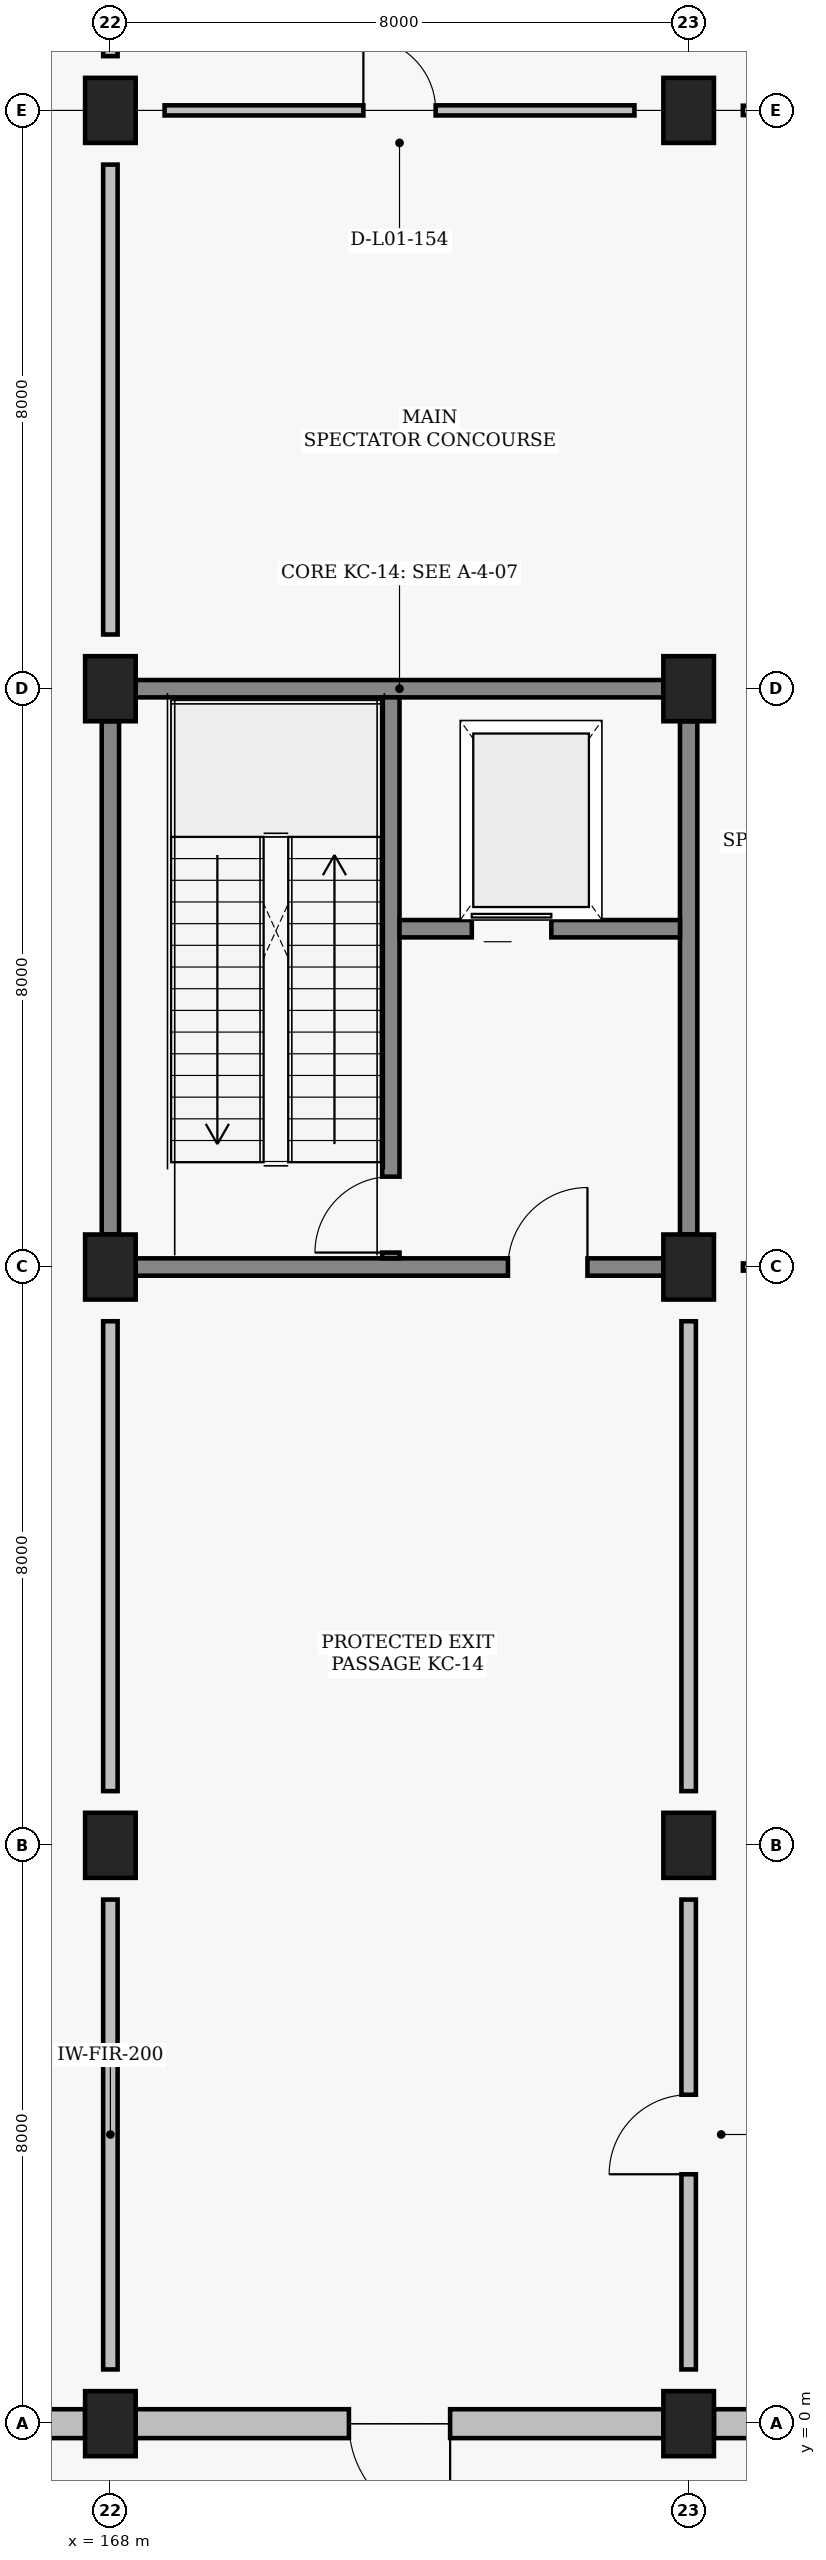
"""IFC4 building model, lengths in metres.
Left out: names, types, materials, properties, quantities, classifications, styles, units other than length and angle.
Written with IfcOpenShell. Run it as: python <this file> out.ifc"""

import sys

from ifc_helpers import new_model, si_unit, direction, frame, frame_2d, origin, origin_2d, place, context, subcontext, project, spatial, rectangle, extrude, element, fill, save


model = new_model("IFC4")
c1 = context("Model", 3, precision=1e-05, world=origin(), true_north=direction((0.0, 1.0)))
c2 = subcontext(c1, "Body", "Model", "MODEL_VIEW")
j1 = project(units=[si_unit("LENGTHUNIT", "METRE"), si_unit("PLANEANGLEUNIT", "RADIAN")], contexts=[c1])
p1 = place(None, origin())
s1 = spatial("IfcSite", under=j1, at=p1, CompositionType="ELEMENT")
p2 = place(p1, origin())
s2 = spatial("IfcBuilding", under=s1, at=p2, CompositionType="ELEMENT")
p3 = place(p2, origin())
s3 = spatial("IfcBuildingStorey", under=s2, at=p3, CompositionType="ELEMENT", Elevation=0.0)
for number, where, z_axis, x_axis in (
    (1, (168.0, 0.0, 0.0), (0.0, 0.0, 1.0), (1.0, 0.0, 0.0)),
    (2, (168.0, 8.0, 0.0), (0.0, 0.0, 1.0), (1.0, 0.0, 0.0)),
    (3, (168.0, 16.0, 0.0), (0.0, 0.0, 1.0), (1.0, 0.0, 0.0)),
    (4, (168.0, 24.0, 0.0), (0.0, 0.0, 1.0), (1.0, 0.0, 0.0)),
    (5, (168.0, 32.0, 0.0), (0.0, 0.0, 1.0), (1.0, 0.0, 0.0)),
    (6, (176.0, 0.0, 0.0), (0.0, 0.0, 1.0), (1.0, 0.0, 0.0)),
    (7, (176.0, 8.0, 0.0), (0.0, 0.0, 1.0), (1.0, 0.0, 0.0)),
    (8, (176.0, 16.0, 0.0), (0.0, 0.0, 1.0), (1.0, 0.0, 0.0)),
    (9, (176.0, 24.0, 0.0), (0.0, 0.0, 1.0), (1.0, 0.0, 0.0)),
    (10, (176.0, 32.0, 0.0), (0.0, 0.0, 1.0), (1.0, 0.0, 0.0)),
):
    element("IfcColumn", number, at=place(p3, frame(where, z_axis=z_axis, x_axis=x_axis)), inside=s3, PredefinedType="COLUMN", context=c2, shape_type="SweptSolid", body=[
        extrude(rectangle(XDim=0.7, YDim=0.9, at=origin_2d()), origin(), (0.0, 0.0, 1.0), 4.8),
    ])
p4 = place(p3, frame((167.65, 0.0, 0.0), z_axis=(0.0, 0.0, 1.0), x_axis=(-1.0, 0.0, 0.0)))
e11 = element("IfcWall", 11, at=p4, inside=s3, PredefinedType="SOLIDWALL", context=c2, shape_type="SweptSolid", body=[
    extrude(rectangle(XDim=7.3, YDim=0.4, at=frame_2d((3.65, 0.0))), origin(), (0.0, 0.0, 1.0), 3.81),
])
p5 = place(p4, frame((2.95, 0.0, 0.0)))
e12 = element("IfcOpeningElement", 12, at=p5, cuts=e11, PredefinedType="OPENING", context=c2, shape_type="SweptSolid", body=[
    extrude(rectangle(XDim=1.4, YDim=2.2, at=frame_2d((0.7, 1.1))), frame((0.0, 0.21, 0.0), z_axis=(0.0, -1.0, 0.0), x_axis=(1.0, 0.0, 0.0)), (0.0, 0.0, 1.0), 0.42),
])
p6 = place(p3, frame((175.65, 0.0, 0.0), z_axis=(0.0, 0.0, 1.0), x_axis=(-1.0, 0.0, 0.0)))
e13 = element("IfcWall", 13, at=p6, inside=s3, PredefinedType="SOLIDWALL", context=c2, shape_type="SweptSolid", body=[
    extrude(rectangle(XDim=7.3, YDim=0.4, at=frame_2d((3.65, 0.0))), origin(), (0.0, 0.0, 1.0), 3.81),
])
p7 = place(p6, frame((2.95, 0.0, 0.0)))
e14 = element("IfcOpeningElement", 14, at=p7, cuts=e13, PredefinedType="OPENING", context=c2, shape_type="SweptSolid", body=[
    extrude(rectangle(XDim=1.4, YDim=2.2, at=frame_2d((0.7, 1.1))), frame((0.0, 0.21, 0.0), z_axis=(0.0, -1.0, 0.0), x_axis=(1.0, 0.0, 0.0)), (0.0, 0.0, 1.0), 0.42),
])
p8 = place(p3, frame((176.35, 0.0, 0.0), z_axis=(0.0, 0.0, 1.0), x_axis=(1.0, 0.0, 0.0)))
e15 = element("IfcWall", 15, at=p8, inside=s3, PredefinedType="SOLIDWALL", context=c2, shape_type="SweptSolid", body=[
    extrude(rectangle(XDim=7.3, YDim=0.4, at=frame_2d((3.65, 0.0))), origin(), (0.0, 0.0, 1.0), 3.81),
])
p9 = place(p8, frame((1.95, 0.0, 0.0)))
e16 = element("IfcOpeningElement", 16, at=p9, cuts=e15, PredefinedType="OPENING", context=c2, shape_type="SweptSolid", body=[
    extrude(rectangle(XDim=3.4, YDim=2.75, at=frame_2d((1.7, 1.375))), frame((0.0, 0.21, 0.0), z_axis=(0.0, -1.0, 0.0), x_axis=(1.0, 0.0, 0.0)), (0.0, 0.0, 1.0), 0.42),
])
p10 = place(p3, frame((168.35, 16.0, 0.0), z_axis=(0.0, 0.0, 1.0), x_axis=(1.0, 0.0, 0.0)))
e17 = element("IfcWall", 17, at=p10, inside=s3, PredefinedType="SHEAR", context=c2, shape_type="SweptSolid", body=[
    extrude(rectangle(XDim=7.3, YDim=0.24, at=frame_2d((3.65, 0.0))), origin(), (0.0, 0.0, 1.0), 3.81),
])
p11 = place(p10, frame((5.15, 0.0, 0.0)))
e18 = element("IfcOpeningElement", 18, at=p11, cuts=e17, PredefinedType="OPENING", context=c2, shape_type="SweptSolid", body=[
    extrude(rectangle(XDim=1.1, YDim=2.2, at=frame_2d((0.55, 1.1))), frame((0.0, 0.13, 0.0), z_axis=(0.0, -1.0, 0.0), x_axis=(1.0, 0.0, 0.0)), (0.0, 0.0, 1.0), 0.26),
])
p12 = place(p3, frame((168.35, 24.0, 0.0), z_axis=(0.0, 0.0, 1.0), x_axis=(1.0, 0.0, 0.0)))
e19 = element("IfcWall", 19, at=p12, inside=s3, PredefinedType="SHEAR", context=c2, shape_type="SweptSolid", body=[
    extrude(rectangle(XDim=7.3, YDim=0.24, at=frame_2d((3.65, 0.0))), origin(), (0.0, 0.0, 1.0), 3.66),
])
p13 = place(p3, frame((168.0, 16.45, 0.0), z_axis=(0.0, 0.0, 1.0), x_axis=(0.0, 1.0, 0.0)))
e20 = element("IfcWall", 20, at=p13, inside=s3, PredefinedType="SHEAR", context=c2, shape_type="SweptSolid", body=[
    extrude(rectangle(XDim=7.1, YDim=0.24, at=frame_2d((3.55, 0.0))), origin(), (0.0, 0.0, 1.0), 3.81),
])
p14 = place(p3, frame((176.0, 16.45, 0.0), z_axis=(0.0, 0.0, 1.0), x_axis=(0.0, 1.0, 0.0)))
e21 = element("IfcWall", 21, at=p14, inside=s3, PredefinedType="SHEAR", context=c2, shape_type="SweptSolid", body=[
    extrude(rectangle(XDim=7.1, YDim=0.24, at=frame_2d((3.55, 0.0))), origin(), (0.0, 0.0, 1.0), 3.66),
])
p15 = place(p3, frame((171.88, 16.12, 0.0), z_axis=(0.0, 0.0, 1.0), x_axis=(0.0, 1.0, 0.0)))
e22 = element("IfcWall", 22, at=p15, inside=s3, PredefinedType="SHEAR", context=c2, shape_type="SweptSolid", body=[
    extrude(rectangle(XDim=7.76, YDim=0.24, at=frame_2d((3.88, 0.0))), origin(), (0.0, 0.0, 1.0), 4.01),
])
p16 = place(p15, frame((0.08, 0.0, 0.0)))
e23 = element("IfcOpeningElement", 23, at=p16, cuts=e22, PredefinedType="OPENING", context=c2, shape_type="SweptSolid", body=[
    extrude(rectangle(XDim=1.05, YDim=2.15, at=frame_2d((0.525, 1.075))), frame((0.0, 0.13, 0.0), z_axis=(0.0, -1.0, 0.0), x_axis=(1.0, 0.0, 0.0)), (0.0, 0.0, 1.0), 0.26),
])
p17 = place(p3, frame((172.0, 20.68, 0.0), z_axis=(0.0, 0.0, 1.0), x_axis=(1.0, 0.0, 0.0)))
e24 = element("IfcWall", 24, at=p17, inside=s3, PredefinedType="SHEAR", context=c2, shape_type="SweptSolid", body=[
    extrude(rectangle(XDim=3.88, YDim=0.24, at=frame_2d((1.94, 0.0))), origin(), (0.0, 0.0, 1.0), 3.81),
])
p18 = place(p17, frame((1.0, 0.0, 0.0)))
e25 = element("IfcOpeningElement", 25, at=p18, cuts=e24, PredefinedType="OPENING", context=c2, shape_type="SweptSolid", body=[
    extrude(rectangle(XDim=1.1, YDim=2.15, at=frame_2d((0.55, 1.075))), frame((0.0, 0.13, 0.0), z_axis=(0.0, -1.0, 0.0), x_axis=(1.0, 0.0, 0.0)), (0.0, 0.0, 1.0), 0.26),
])
p19 = place(p3, frame((168.0, 0.75, 0.0), z_axis=(0.0, 0.0, 1.0), x_axis=(0.0, 1.0, 0.0)))
e26 = element("IfcWall", 26, at=p19, inside=s3, PredefinedType="PARTITIONING", context=c2, shape_type="SweptSolid", body=[
    extrude(rectangle(XDim=6.5, YDim=0.2, at=frame_2d((3.25, 0.0))), origin(), (0.0, 0.0, 1.0), 3.81),
])
p20 = place(p3, frame((176.0, 0.75, 0.0), z_axis=(0.0, 0.0, 1.0), x_axis=(0.0, 1.0, 0.0)))
e27 = element("IfcWall", 27, at=p20, inside=s3, PredefinedType="PARTITIONING", context=c2, shape_type="SweptSolid", body=[
    extrude(rectangle(XDim=6.5, YDim=0.2, at=frame_2d((3.25, 0.0))), origin(), (0.0, 0.0, 1.0), 3.81),
])
p21 = place(p20, frame((2.7, 0.0, 0.0)))
e28 = element("IfcOpeningElement", 28, at=p21, cuts=e27, PredefinedType="OPENING", context=c2, shape_type="SweptSolid", body=[
    extrude(rectangle(XDim=1.1, YDim=2.2, at=frame_2d((0.55, 1.1))), frame((0.0, 0.11, 0.0), z_axis=(0.0, -1.0, 0.0), x_axis=(1.0, 0.0, 0.0)), (0.0, 0.0, 1.0), 0.22),
])
for number, where, z_axis, x_axis in (
    (29, (168.0, 8.75, 0.0), (0.0, 0.0, 1.0), (0.0, 1.0, 0.0)),
    (30, (176.0, 8.75, 0.0), (0.0, 0.0, 1.0), (0.0, 1.0, 0.0)),
    (31, (168.0, 24.75, 0.0), (0.0, 0.0, 1.0), (0.0, 1.0, 0.0)),
    (32, (168.0, 32.75, 0.0), (0.0, 0.0, 1.0), (0.0, 1.0, 0.0)),
):
    element("IfcWall", number, at=place(p3, frame(where, z_axis=z_axis, x_axis=x_axis)), inside=s3, PredefinedType="PARTITIONING", context=c2, shape_type="SweptSolid", body=[
        extrude(rectangle(XDim=6.5, YDim=0.2, at=frame_2d((3.25, 0.0))), origin(), (0.0, 0.0, 1.0), 3.81),
    ])
p22 = place(p3, frame((168.75, 32.0, 0.0), z_axis=(0.0, 0.0, 1.0), x_axis=(1.0, 0.0, 0.0)))
e33 = element("IfcWall", 33, at=p22, inside=s3, PredefinedType="MOVABLE", context=c2, shape_type="SweptSolid", body=[
    extrude(rectangle(XDim=6.5, YDim=0.14, at=frame_2d((3.25, 0.0))), origin(), (0.0, 0.0, 1.0), 3.66),
])
p23 = place(p22, frame((2.75, 0.0, 0.0)))
e34 = element("IfcOpeningElement", 34, at=p23, cuts=e33, PredefinedType="OPENING", context=c2, shape_type="SweptSolid", body=[
    extrude(rectangle(XDim=1.0, YDim=2.1, at=frame_2d((0.5, 1.05))), frame((0.0, 0.08, 0.0), z_axis=(0.0, -1.0, 0.0), x_axis=(1.0, 0.0, 0.0)), (0.0, 0.0, 1.0), 0.16),
])
p24 = place(p3, frame((176.75, 16.0, 0.0), z_axis=(0.0, 0.0, 1.0), x_axis=(1.0, 0.0, 0.0)))
e35 = element("IfcWall", 35, at=p24, inside=s3, PredefinedType="PARTITIONING", context=c2, shape_type="SweptSolid", body=[
    extrude(rectangle(XDim=6.5, YDim=0.1, at=frame_2d((3.25, 0.0))), origin(), (0.0, 0.0, 1.0), 3.91),
])
p25 = place(p24, frame((2.775, 0.0, 0.0)))
e36 = element("IfcOpeningElement", 36, at=p25, cuts=e35, PredefinedType="OPENING", context=c2, shape_type="SweptSolid", body=[
    extrude(rectangle(XDim=0.95, YDim=2.1, at=frame_2d((0.475, 1.05))), frame((0.0, 0.06, 0.0), z_axis=(0.0, -1.0, 0.0), x_axis=(1.0, 0.0, 0.0)), (0.0, 0.0, 1.0), 0.12),
])
p26 = place(p3, frame((176.75, 32.0, 0.0), z_axis=(0.0, 0.0, 1.0), x_axis=(1.0, 0.0, 0.0)))
e37 = element("IfcWall", 37, at=p26, inside=s3, PredefinedType="PARTITIONING", context=c2, shape_type="SweptSolid", body=[
    extrude(rectangle(XDim=6.5, YDim=0.13, at=frame_2d((3.25, 0.0))), origin(), (0.0, 0.0, 1.0), 3.91),
])
p27 = place(p26, frame((2.75, 0.0, 0.0)))
e38 = element("IfcOpeningElement", 38, at=p27, cuts=e37, PredefinedType="OPENING", context=c2, shape_type="SweptSolid", body=[
    extrude(rectangle(XDim=1.0, YDim=2.1, at=frame_2d((0.5, 1.05))), frame((0.0, 0.075, 0.0), z_axis=(0.0, -1.0, 0.0), x_axis=(1.0, 0.0, 0.0)), (0.0, 0.0, 1.0), 0.15),
])
p28 = place(p7, origin())
e39 = element("IfcDoor", 39, at=p28, inside=s3, OperationType="SINGLE_SWING_LEFT", PredefinedType="DOOR", context=c2, shape_type="SweptSolid", body=[
    extrude(rectangle(XDim=1.4, YDim=2.2, at=frame_2d((0.7, 1.1))), frame((0.0, 0.025, 0.0), z_axis=(0.0, -1.0, 0.0), x_axis=(1.0, 0.0, 0.0)), (0.0, 0.0, 1.0), 0.05),
])
fill(e14, e39)
p29 = place(p11, origin())
e40 = element("IfcDoor", 40, at=p29, inside=s3, OperationType="SINGLE_SWING_RIGHT", PredefinedType="DOOR", context=c2, shape_type="SweptSolid", body=[
    extrude(rectangle(XDim=1.1, YDim=2.2, at=frame_2d((0.55, 1.1))), frame((0.0, 0.025, 0.0), z_axis=(0.0, -1.0, 0.0), x_axis=(1.0, 0.0, 0.0)), (0.0, 0.0, 1.0), 0.05),
])
fill(e18, e40)
p30 = place(p16, origin())
e41 = element("IfcDoor", 41, at=p30, inside=s3, OperationType="SINGLE_SWING_LEFT", PredefinedType="DOOR", context=c2, shape_type="SweptSolid", body=[
    extrude(rectangle(XDim=1.05, YDim=2.15, at=frame_2d((0.525, 1.075))), frame((0.0, 0.025, 0.0), z_axis=(0.0, -1.0, 0.0), x_axis=(1.0, 0.0, 0.0)), (0.0, 0.0, 1.0), 0.05),
])
fill(e23, e41)
p31 = place(p18, origin())
e42 = element("IfcDoor", 42, at=p31, inside=s3, OperationType="SLIDING_TO_LEFT", PredefinedType="DOOR", context=c2, shape_type="SweptSolid", body=[
    extrude(rectangle(XDim=1.1, YDim=2.15, at=frame_2d((0.55, 1.075))), frame((0.0, 0.025, 0.0), z_axis=(0.0, -1.0, 0.0), x_axis=(1.0, 0.0, 0.0)), (0.0, 0.0, 1.0), 0.05),
])
fill(e25, e42)
p32 = place(p21, origin())
e43 = element("IfcDoor", 43, at=p32, inside=s3, OperationType="SINGLE_SWING_LEFT", PredefinedType="DOOR", context=c2, shape_type="SweptSolid", body=[
    extrude(rectangle(XDim=1.1, YDim=2.2, at=frame_2d((0.55, 1.1))), frame((0.0, 0.025, 0.0), z_axis=(0.0, -1.0, 0.0), x_axis=(1.0, 0.0, 0.0)), (0.0, 0.0, 1.0), 0.05),
])
fill(e28, e43)
p33 = place(p23, origin())
e44 = element("IfcDoor", 44, at=p33, inside=s3, OperationType="SINGLE_SWING_LEFT", PredefinedType="DOOR", context=c2, shape_type="SweptSolid", body=[
    extrude(rectangle(XDim=1.0, YDim=2.1, at=frame_2d((0.5, 1.05))), frame((0.0, 0.025, 0.0), z_axis=(0.0, -1.0, 0.0), x_axis=(1.0, 0.0, 0.0)), (0.0, 0.0, 1.0), 0.05),
])
fill(e34, e44)
save(model, sys.argv[1])
